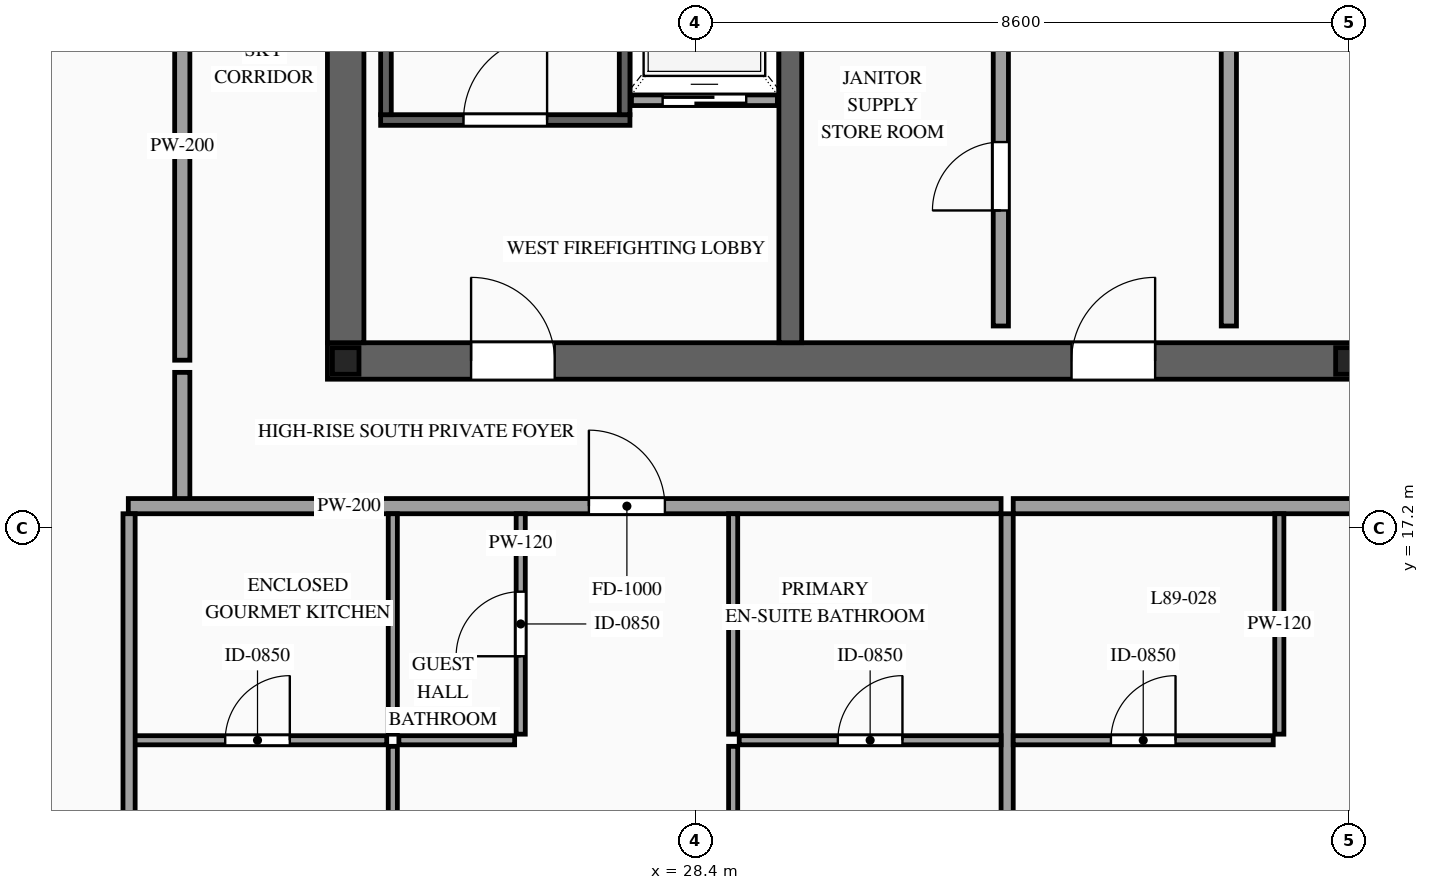
"""IFC4 building model, lengths in metres.
Left out: names, types, materials, properties, quantities, classifications, styles, units other than length and angle.
Written with IfcOpenShell. Run it as: python <this file> out.ifc"""

import sys

from ifc_helpers import new_model, si_unit, direction, frame, frame_2d, origin, origin_2d, place, context, subcontext, project, spatial, rectangle, i_section, extrude, source, transform, mapped, element, fill, save


model = new_model("IFC4")
c1 = context("Model", 3, precision=1e-05, world=origin(), true_north=direction((0.0, 1.0)))
c2 = subcontext(c1, "Body", "Model", "MODEL_VIEW")
j1 = project(units=[si_unit("LENGTHUNIT", "METRE"), si_unit("PLANEANGLEUNIT", "RADIAN")], contexts=[c1])
p1 = place(None, origin())
s1 = spatial("IfcSite", under=j1, at=p1, CompositionType="ELEMENT")
p2 = place(p1, origin())
s2 = spatial("IfcBuilding", under=s1, at=p2, CompositionType="ELEMENT")
p3 = place(p2, frame((0.0, 0.0, 332.2)))
s3 = spatial("IfcBuildingStorey", under=s2, at=p3, CompositionType="ELEMENT", Elevation=332.2)
p4 = place(p3, frame((23.56, 19.4, 0.0), z_axis=(0.0, 0.0, 1.0), x_axis=(1.0, 0.0, 0.0)))
e1 = element("IfcWall", 1, at=p4, inside=s3, PredefinedType="SHEAR", context=c2, shape_type="SweptSolid", body=[
    extrude(rectangle(XDim=26.88, YDim=0.48, at=frame_2d((13.44, 0.0))), origin(), (0.0, 0.0, 1.0), 3.5),
])
p5 = place(p4, frame((1.89, 0.0, 0.0)))
e2 = element("IfcOpeningElement", 2, at=p5, cuts=e1, PredefinedType="OPENING", context=c2, shape_type="SweptSolid", body=[
    extrude(rectangle(XDim=1.1, YDim=2.2, at=frame_2d((0.55, 1.1))), frame((0.0, 0.255, 0.0), z_axis=(0.0, -1.0, 0.0), x_axis=(1.0, 0.0, 0.0)), (0.0, 0.0, 1.0), 0.51),
])
p6 = place(p4, frame((9.79, 0.0, 0.0)))
e3 = element("IfcOpeningElement", 3, at=p6, cuts=e1, PredefinedType="OPENING", context=c2, shape_type="SweptSolid", body=[
    extrude(rectangle(XDim=1.1, YDim=2.2, at=frame_2d((0.55, 1.1))), frame((0.0, 0.255, 0.0), z_axis=(0.0, -1.0, 0.0), x_axis=(1.0, 0.0, 0.0)), (0.0, 0.0, 1.0), 0.51),
])
p7 = place(p4, frame((22.99, 0.0, 0.0)))
e4 = element("IfcOpeningElement", 4, at=p7, cuts=e1, PredefinedType="OPENING", context=c2, shape_type="SweptSolid", body=[
    extrude(rectangle(XDim=1.1, YDim=2.2, at=frame_2d((0.55, 1.1))), frame((0.0, 0.255, 0.0), z_axis=(0.0, -1.0, 0.0), x_axis=(1.0, 0.0, 0.0)), (0.0, 0.0, 1.0), 0.51),
])
p8 = place(p4, frame((19.61, 0.0, 0.0)))
e5 = element("IfcOpeningElement", 5, at=p8, cuts=e1, PredefinedType="OPENING", context=c2, shape_type="SweptSolid", body=[
    extrude(rectangle(XDim=0.9, YDim=2.15, at=frame_2d((0.45, 1.075))), frame((0.0, 0.255, 0.0), z_axis=(0.0, -1.0, 0.0), x_axis=(1.0, 0.0, 0.0)), (0.0, 0.0, 1.0), 0.51),
])
p9 = place(p4, frame((18.17, 0.0, 0.0)))
e6 = element("IfcOpeningElement", 6, at=p9, cuts=e1, PredefinedType="OPENING", context=c2, shape_type="SweptSolid", body=[
    extrude(rectangle(XDim=0.9, YDim=2.15, at=frame_2d((0.45, 1.075))), frame((0.0, 0.255, 0.0), z_axis=(0.0, -1.0, 0.0), x_axis=(1.0, 0.0, 0.0)), (0.0, 0.0, 1.0), 0.51),
])
m1 = source(origin(), c2, "Body", "SweptSolid", [
    extrude(rectangle(XDim=12.32, YDim=0.48, at=frame_2d((6.16, 0.0))), origin(), (0.0, 0.0, 1.0), 3.5),
])
p10 = place(p3, frame((23.8, 19.64, 0.0), z_axis=(0.0, 0.0, 1.0), x_axis=(0.0, 1.0, 0.0)))
e7 = element("IfcWall", 7, at=p10, inside=s3, PredefinedType="SHEAR", context=c2, shape_type="MappedRepresentation", body=[
    mapped(m1, transform((0.0, 0.0, 0.0), scale=1.0)),
])
m2 = source(origin(), c2, "Body", "SweptSolid", [
    extrude(rectangle(XDim=12.32, YDim=0.3, at=frame_2d((6.16, 0.0))), origin(), (0.0, 0.0, 1.0), 3.5),
])
p11 = place(p3, frame((29.65, 19.64, 0.0), z_axis=(0.0, 0.0, 1.0), x_axis=(0.0, 1.0, 0.0)))
e8 = element("IfcWall", 8, at=p11, inside=s3, PredefinedType="SOLIDWALL", context=c2, shape_type="MappedRepresentation", body=[
    mapped(m2, transform((0.0, 0.0, 0.0), scale=1.0)),
])
m3 = source(origin(), c2, "Body", "SweptSolid", [
    extrude(i_section(OverallWidth=0.35, OverallDepth=0.35, WebThickness=0.012, FlangeThickness=0.019, at=origin_2d()), origin(), (0.0, 0.0, 1.0), 3.5),
])
for number, where, z_axis, x_axis in (
    (9, (23.8, 19.4, 0.0), (0.0, 0.0, 1.0), (1.0, 0.0, 0.0)),
    (10, (37.0, 19.4, 0.0), (0.0, 0.0, 1.0), (1.0, 0.0, 0.0)),
):
    element("IfcColumn", number, at=place(p3, frame(where, z_axis=z_axis, x_axis=x_axis)), inside=s3, PredefinedType="COLUMN", context=c2, shape_type="MappedRepresentation", body=[
        mapped(m3, transform((0.0, 0.0, 0.0), scale=1.0)),
    ])
p12 = place(p3, frame((27.56, 22.83, 0.0), z_axis=(0.0, 0.0, 1.0), x_axis=(1.0, 0.0, 0.0)))
e11 = element("IfcWall", 11, at=p12, inside=s3, PredefinedType="SOLIDWALL", context=c2, shape_type="SweptSolid", body=[
    extrude(rectangle(XDim=1.92, YDim=0.14, at=frame_2d((0.96, 0.0))), origin(), (0.0, 0.0, 1.0), 3.28),
])
p13 = place(p12, frame((0.41, 0.0, 0.0)))
e12 = element("IfcOpeningElement", 12, at=p13, cuts=e11, PredefinedType="OPENING", context=c2, shape_type="SweptSolid", body=[
    extrude(rectangle(XDim=1.1, YDim=2.2, at=frame_2d((0.55, 1.1))), frame((0.0, 0.085, 0.0), z_axis=(0.0, -1.0, 0.0), x_axis=(1.0, 0.0, 0.0)), (0.0, 0.0, 1.0), 0.17),
])
p14 = place(p3, frame((24.26, 22.57, 0.0), z_axis=(0.0, 0.0, 1.0), x_axis=(1.0, 0.0, 0.0)))
e13 = element("IfcWall", 13, at=p14, inside=s3, PredefinedType="SOLIDWALL", context=c2, shape_type="SweptSolid", body=[
    extrude(rectangle(XDim=3.28, YDim=0.14, at=frame_2d((1.64, 0.0))), origin(), (0.0, 0.0, 1.0), 3.28),
])
p15 = place(p14, frame((1.09, 0.0, 0.0)))
e14 = element("IfcOpeningElement", 14, at=p15, cuts=e13, PredefinedType="OPENING", context=c2, shape_type="SweptSolid", body=[
    extrude(rectangle(XDim=1.1, YDim=2.2, at=frame_2d((0.55, 1.1))), frame((0.0, 0.085, 0.0), z_axis=(0.0, -1.0, 0.0), x_axis=(1.0, 0.0, 0.0)), (0.0, 0.0, 1.0), 0.17),
])
m4 = source(origin(), c2, "Body", "SweptSolid", [
    extrude(rectangle(XDim=8.94, YDim=0.14, at=frame_2d((4.47, 0.0))), origin(), (0.0, 0.0, 1.0), 3.28),
])
for number, where, z_axis, x_axis in (
    (15, (24.33, 22.64, 0.0), (0.0, 0.0, 1.0), (0.0, 1.0, 0.0)),
    (16, (27.47, 22.64, 0.0), (0.0, 0.0, 1.0), (0.0, 1.0, 0.0)),
):
    element("IfcWall", number, at=place(p3, frame(where, z_axis=z_axis, x_axis=x_axis)), inside=s3, PredefinedType="SOLIDWALL", context=c2, shape_type="MappedRepresentation", body=[
        mapped(m4, transform((0.0, 0.0, 0.0), scale=1.0)),
    ])
p16 = place(p3, frame((32.42, 19.86, 0.0), z_axis=(0.0, 0.0, 1.0), x_axis=(0.0, 1.0, 0.0)))
e17 = element("IfcWall", 17, at=p16, inside=s3, PredefinedType="PARTITIONING", context=c2, shape_type="SweptSolid", body=[
    extrude(rectangle(XDim=3.94, YDim=0.2, at=frame_2d((1.97, 0.0))), origin(), (0.0, 0.0, 1.0), 3.28),
])
p17 = place(p16, frame((1.52, 0.0, 0.0)))
e18 = element("IfcOpeningElement", 18, at=p17, cuts=e17, PredefinedType="OPENING", context=c2, shape_type="SweptSolid", body=[
    extrude(rectangle(XDim=0.9, YDim=2.15, at=frame_2d((0.45, 1.075))), frame((0.0, 0.115, 0.0), z_axis=(0.0, -1.0, 0.0), x_axis=(1.0, 0.0, 0.0)), (0.0, 0.0, 1.0), 0.23),
])
p18 = place(p3, frame((35.42, 19.86, 0.0), z_axis=(0.0, 0.0, 1.0), x_axis=(0.0, 1.0, 0.0)))
e19 = element("IfcWall", 19, at=p18, inside=s3, PredefinedType="PARTITIONING", context=c2, shape_type="SweptSolid", body=[
    extrude(rectangle(XDim=9.19, YDim=0.2, at=frame_2d((4.595, 0.0))), origin(), (0.0, 0.0, 1.0), 3.28),
])
p19 = place(p18, frame((4.145, 0.0, 0.0)))
e20 = element("IfcOpeningElement", 20, at=p19, cuts=e19, PredefinedType="OPENING", context=c2, shape_type="SweptSolid", body=[
    extrude(rectangle(XDim=0.9, YDim=2.15, at=frame_2d((0.45, 1.075))), frame((0.0, 0.115, 0.0), z_axis=(0.0, -1.0, 0.0), x_axis=(1.0, 0.0, 0.0)), (0.0, 0.0, 1.0), 0.23),
])
m5 = source(origin(), c2, "Body", "SweptSolid", [
    extrude(rectangle(XDim=1.7, YDim=0.2, at=frame_2d((0.85, 0.0))), origin(), (0.0, 0.0, 1.0), 3.28),
])
p20 = place(p3, frame((21.65, 17.55, 0.0), z_axis=(0.0, 0.0, 1.0), x_axis=(0.0, 1.0, 0.0)))
e21 = element("IfcWall", 21, at=p20, inside=s3, PredefinedType="PARTITIONING", context=c2, shape_type="MappedRepresentation", body=[
    mapped(m5, transform((0.0, 0.0, 0.0), scale=1.0)),
])
p21 = place(p3, frame((20.94, 17.49, 0.0), z_axis=(0.0, 0.0, 1.0), x_axis=(1.0, 0.0, 0.0)))
e22 = element("IfcWall", 22, at=p21, inside=s3, PredefinedType="PARTITIONING", context=c2, shape_type="SweptSolid", body=[
    extrude(rectangle(XDim=11.483, YDim=0.2, at=frame_2d((5.742, 0.0))), origin(), (0.0, 0.0, 1.0), 3.28),
])
p22 = place(p21, frame((6.06, 0.0, 0.0)))
e23 = element("IfcOpeningElement", 23, at=p22, cuts=e22, PredefinedType="OPENING", context=c2, shape_type="SweptSolid", body=[
    extrude(rectangle(XDim=1.0, YDim=2.2, at=frame_2d((0.5, 1.1))), frame((0.0, 0.115, 0.0), z_axis=(0.0, -1.0, 0.0), x_axis=(1.0, 0.0, 0.0)), (0.0, 0.0, 1.0), 0.23),
])
m6 = source(origin(), c2, "Body", "SweptSolid", [
    extrude(rectangle(XDim=10.54, YDim=0.16, at=frame_2d((5.27, 0.0))), origin(), (0.0, 0.0, 1.0), 3.28),
])
p23 = place(p3, frame((32.503, 6.85, 0.0), z_axis=(0.0, 0.0, 1.0), x_axis=(0.0, 1.0, 0.0)))
e24 = element("IfcWall", 24, at=p23, inside=s3, PredefinedType="PARTITIONING", context=c2, shape_type="MappedRepresentation", body=[
    mapped(m6, transform((0.0, 0.0, 0.0), scale=1.0)),
])
p24 = place(p3, frame((20.94, 14.41, 0.0), z_axis=(0.0, 0.0, 1.0), x_axis=(1.0, 0.0, 0.0)))
e25 = element("IfcWall", 25, at=p24, inside=s3, PredefinedType="PARTITIONING", context=c2, shape_type="SweptSolid", body=[
    extrude(rectangle(XDim=3.4, YDim=0.12, at=frame_2d((1.7, 0.0))), origin(), (0.0, 0.0, 1.0), 3.28),
])
p25 = place(p24, frame((1.275, 0.0, 0.0)))
e26 = element("IfcOpeningElement", 26, at=p25, cuts=e25, PredefinedType="OPENING", context=c2, shape_type="SweptSolid", body=[
    extrude(rectangle(XDim=0.85, YDim=2.1, at=frame_2d((0.425, 1.05))), frame((0.0, 0.075, 0.0), z_axis=(0.0, -1.0, 0.0), x_axis=(1.0, 0.0, 0.0)), (0.0, 0.0, 1.0), 0.15),
])
m7 = source(origin(), c2, "Body", "SweptSolid", [
    extrude(rectangle(XDim=2.9, YDim=0.12, at=frame_2d((1.45, 0.0))), origin(), (0.0, 0.0, 1.0), 3.28),
])
p26 = place(p3, frame((24.42, 14.49, 0.0), z_axis=(0.0, 0.0, 1.0), x_axis=(0.0, 1.0, 0.0)))
e27 = element("IfcWall", 27, at=p26, inside=s3, PredefinedType="PARTITIONING", context=c2, shape_type="MappedRepresentation", body=[
    mapped(m7, transform((0.0, 0.0, 0.0), scale=1.0)),
])
m8 = source(origin(), c2, "Body", "SweptSolid", [
    extrude(rectangle(XDim=1.523, YDim=0.12, at=frame_2d((0.761, 0.0))), origin(), (0.0, 0.0, 1.0), 3.28),
])
p27 = place(p3, frame((24.5, 14.41, 0.0), z_axis=(0.0, 0.0, 1.0), x_axis=(1.0, 0.0, 0.0)))
e28 = element("IfcWall", 28, at=p27, inside=s3, PredefinedType="PARTITIONING", context=c2, shape_type="MappedRepresentation", body=[
    mapped(m8, transform((0.0, 0.0, 0.0), scale=1.0)),
])
p28 = place(p3, frame((26.103, 14.49, 0.0), z_axis=(0.0, 0.0, 1.0), x_axis=(0.0, 1.0, 0.0)))
e29 = element("IfcWall", 29, at=p28, inside=s3, PredefinedType="PARTITIONING", context=c2, shape_type="SweptSolid", body=[
    extrude(rectangle(XDim=2.9, YDim=0.12, at=frame_2d((1.45, 0.0))), origin(), (0.0, 0.0, 1.0), 3.28),
])
p29 = place(p28, frame((1.025, 0.0, 0.0)))
e30 = element("IfcOpeningElement", 30, at=p29, cuts=e29, PredefinedType="OPENING", context=c2, shape_type="SweptSolid", body=[
    extrude(rectangle(XDim=0.85, YDim=2.1, at=frame_2d((0.425, 1.05))), frame((0.0, 0.075, 0.0), z_axis=(0.0, -1.0, 0.0), x_axis=(1.0, 0.0, 0.0)), (0.0, 0.0, 1.0), 0.15),
])
p30 = place(p3, frame((28.978, 14.41, 0.0), z_axis=(0.0, 0.0, 1.0), x_axis=(1.0, 0.0, 0.0)))
e31 = element("IfcWall", 31, at=p30, inside=s3, PredefinedType="PARTITIONING", context=c2, shape_type="SweptSolid", body=[
    extrude(rectangle(XDim=3.445, YDim=0.12, at=frame_2d((1.723, 0.0))), origin(), (0.0, 0.0, 1.0), 3.28),
])
p31 = place(p30, frame((1.298, 0.0, 0.0)))
e32 = element("IfcOpeningElement", 32, at=p31, cuts=e31, PredefinedType="OPENING", context=c2, shape_type="SweptSolid", body=[
    extrude(rectangle(XDim=0.85, YDim=2.1, at=frame_2d((0.425, 1.05))), frame((0.0, 0.075, 0.0), z_axis=(0.0, -1.0, 0.0), x_axis=(1.0, 0.0, 0.0)), (0.0, 0.0, 1.0), 0.15),
])
p32 = place(p3, frame((28.898, 14.49, 0.0), z_axis=(0.0, 0.0, 1.0), x_axis=(0.0, 1.0, 0.0)))
e33 = element("IfcWall", 33, at=p32, inside=s3, PredefinedType="PARTITIONING", context=c2, shape_type="MappedRepresentation", body=[
    mapped(m7, transform((0.0, 0.0, 0.0), scale=1.0)),
])
p33 = place(p3, frame((24.42, 6.85, 0.0), z_axis=(0.0, 0.0, 1.0), x_axis=(0.0, 1.0, 0.0)))
e34 = element("IfcWall", 34, at=p33, inside=s3, PredefinedType="PARTITIONING", context=c2, shape_type="SweptSolid", body=[
    extrude(rectangle(XDim=7.48, YDim=0.12, at=frame_2d((3.74, 0.0))), origin(), (0.0, 0.0, 1.0), 3.28),
])
p34 = place(p33, frame((3.29, 0.0, 0.0)))
e35 = element("IfcOpeningElement", 35, at=p34, cuts=e34, PredefinedType="OPENING", context=c2, shape_type="SweptSolid", body=[
    extrude(rectangle(XDim=0.9, YDim=2.15, at=frame_2d((0.45, 1.075))), frame((0.0, 0.075, 0.0), z_axis=(0.0, -1.0, 0.0), x_axis=(1.0, 0.0, 0.0)), (0.0, 0.0, 1.0), 0.15),
])
p35 = place(p3, frame((28.898, 6.85, 0.0), z_axis=(0.0, 0.0, 1.0), x_axis=(0.0, 1.0, 0.0)))
e36 = element("IfcWall", 36, at=p35, inside=s3, PredefinedType="PARTITIONING", context=c2, shape_type="SweptSolid", body=[
    extrude(rectangle(XDim=7.48, YDim=0.12, at=frame_2d((3.74, 0.0))), origin(), (0.0, 0.0, 1.0), 3.28),
])
p36 = place(p35, frame((3.29, 0.0, 0.0)))
e37 = element("IfcOpeningElement", 37, at=p36, cuts=e36, PredefinedType="OPENING", context=c2, shape_type="SweptSolid", body=[
    extrude(rectangle(XDim=0.9, YDim=2.15, at=frame_2d((0.45, 1.075))), frame((0.0, 0.075, 0.0), z_axis=(0.0, -1.0, 0.0), x_axis=(1.0, 0.0, 0.0)), (0.0, 0.0, 1.0), 0.15),
])
p37 = place(p3, frame((32.583, 17.49, 0.0), z_axis=(0.0, 0.0, 1.0), x_axis=(1.0, 0.0, 0.0)))
e38 = element("IfcWall", 38, at=p37, inside=s3, PredefinedType="PARTITIONING", context=c2, shape_type="SweptSolid", body=[
    extrude(rectangle(XDim=11.403, YDim=0.2, at=frame_2d((5.702, 0.0))), origin(), (0.0, 0.0, 1.0), 3.28),
])
p38 = place(p37, frame((4.517, 0.0, 0.0)))
e39 = element("IfcOpeningElement", 39, at=p38, cuts=e38, PredefinedType="OPENING", context=c2, shape_type="SweptSolid", body=[
    extrude(rectangle(XDim=1.0, YDim=2.2, at=frame_2d((0.5, 1.1))), frame((0.0, 0.115, 0.0), z_axis=(0.0, -1.0, 0.0), x_axis=(1.0, 0.0, 0.0)), (0.0, 0.0, 1.0), 0.23),
])
p39 = place(p3, frame((32.583, 14.41, 0.0), z_axis=(0.0, 0.0, 1.0), x_axis=(1.0, 0.0, 0.0)))
e40 = element("IfcWall", 40, at=p39, inside=s3, PredefinedType="PARTITIONING", context=c2, shape_type="SweptSolid", body=[
    extrude(rectangle(XDim=3.421, YDim=0.12, at=frame_2d((1.71, 0.0))), origin(), (0.0, 0.0, 1.0), 3.28),
])
p40 = place(p39, frame((1.285, 0.0, 0.0)))
e41 = element("IfcOpeningElement", 41, at=p40, cuts=e40, PredefinedType="OPENING", context=c2, shape_type="SweptSolid", body=[
    extrude(rectangle(XDim=0.85, YDim=2.1, at=frame_2d((0.425, 1.05))), frame((0.0, 0.075, 0.0), z_axis=(0.0, -1.0, 0.0), x_axis=(1.0, 0.0, 0.0)), (0.0, 0.0, 1.0), 0.15),
])
p41 = place(p3, frame((36.084, 14.49, 0.0), z_axis=(0.0, 0.0, 1.0), x_axis=(0.0, 1.0, 0.0)))
e42 = element("IfcWall", 42, at=p41, inside=s3, PredefinedType="PARTITIONING", context=c2, shape_type="MappedRepresentation", body=[
    mapped(m7, transform((0.0, 0.0, 0.0), scale=1.0)),
])
m9 = source(origin(), c2, "Body", "SweptSolid", [
    extrude(rectangle(XDim=10.39, YDim=0.16, at=frame_2d((5.195, 0.0))), origin(), (0.0, 0.0, 1.0), 3.28),
])
p42 = place(p3, frame((20.95, 7.0, 0.0), z_axis=(0.0, 0.0, 1.0), x_axis=(0.0, 1.0, 0.0)))
e43 = element("IfcWall", 43, at=p42, inside=s3, PredefinedType="PARTITIONING", context=c2, shape_type="MappedRepresentation", body=[
    mapped(m9, transform((0.0, 0.0, 0.0), scale=1.0)),
])
p43 = place(p3, frame((21.65, 19.41, 0.0), z_axis=(0.0, 0.0, 1.0), x_axis=(0.0, 1.0, 0.0)))
e44 = element("IfcWall", 44, at=p43, inside=s3, PredefinedType="PARTITIONING", context=c2, shape_type="SweptSolid", body=[
    extrude(rectangle(XDim=12.78, YDim=0.2, at=frame_2d((6.39, 0.0))), origin(), (0.0, 0.0, 1.0), 3.28),
])
p44 = place(p43, frame((5.89, 0.0, 0.0)))
e45 = element("IfcOpeningElement", 45, at=p44, cuts=e44, PredefinedType="OPENING", context=c2, shape_type="SweptSolid", body=[
    extrude(rectangle(XDim=1.0, YDim=2.2, at=frame_2d((0.5, 1.1))), frame((0.0, 0.115, 0.0), z_axis=(0.0, -1.0, 0.0), x_axis=(1.0, 0.0, 0.0)), (0.0, 0.0, 1.0), 0.23),
])
m10 = source(origin(), c2, "Body", "SweptSolid", [
    extrude(rectangle(XDim=1.1, YDim=2.2, at=frame_2d((0.55, 1.1))), frame((0.0, 0.025, 0.0), z_axis=(0.0, -1.0, 0.0), x_axis=(1.0, 0.0, 0.0)), (0.0, 0.0, 1.0), 0.05),
])
p45 = place(p13, origin())
e46 = element("IfcDoor", 46, at=p45, inside=s3, OperationType="SLIDING_TO_LEFT", PredefinedType="DOOR", context=c2, shape_type="MappedRepresentation", body=[
    mapped(m10, transform((0.0, 0.0, 0.0), scale=1.0)),
])
fill(e12, e46)
m11 = source(origin(), c2, "Body", "SweptSolid", [
    extrude(rectangle(XDim=1.1, YDim=2.2, at=frame_2d((0.55, 1.1))), frame((0.0, 0.025, 0.0), z_axis=(0.0, -1.0, 0.0), x_axis=(1.0, 0.0, 0.0)), (0.0, 0.0, 1.0), 0.05),
])
p46 = place(p15, origin())
e47 = element("IfcDoor", 47, at=p46, inside=s3, OperationType="SINGLE_SWING_RIGHT", PredefinedType="DOOR", context=c2, shape_type="MappedRepresentation", body=[
    mapped(m11, transform((0.0, 0.0, 0.0), scale=1.0)),
])
fill(e14, e47)
p47 = place(p5, origin())
e48 = element("IfcDoor", 48, at=p47, inside=s3, OperationType="SINGLE_SWING_LEFT", PredefinedType="DOOR", context=c2, shape_type="MappedRepresentation", body=[
    mapped(m11, transform((0.0, 0.0, 0.0), scale=1.0)),
])
fill(e2, e48)
p48 = place(p6, origin())
e49 = element("IfcDoor", 49, at=p48, inside=s3, OperationType="SINGLE_SWING_RIGHT", PredefinedType="DOOR", context=c2, shape_type="MappedRepresentation", body=[
    mapped(m11, transform((0.0, 0.0, 0.0), scale=1.0)),
])
fill(e3, e49)
m12 = source(origin(), c2, "Body", "SweptSolid", [
    extrude(rectangle(XDim=0.9, YDim=2.15, at=frame_2d((0.45, 1.075))), frame((0.0, 0.025, 0.0), z_axis=(0.0, -1.0, 0.0), x_axis=(1.0, 0.0, 0.0)), (0.0, 0.0, 1.0), 0.05),
])
p49 = place(p17, origin())
e50 = element("IfcDoor", 50, at=p49, inside=s3, OperationType="SINGLE_SWING_LEFT", PredefinedType="DOOR", context=c2, shape_type="MappedRepresentation", body=[
    mapped(m12, transform((0.0, 0.0, 0.0), scale=1.0)),
])
fill(e18, e50)
m13 = source(origin(), c2, "Body", "SweptSolid", [
    extrude(rectangle(XDim=1.0, YDim=2.2, at=frame_2d((0.5, 1.1))), frame((0.0, 0.025, 0.0), z_axis=(0.0, -1.0, 0.0), x_axis=(1.0, 0.0, 0.0)), (0.0, 0.0, 1.0), 0.05),
])
p50 = place(p22, origin())
e51 = element("IfcDoor", 51, at=p50, inside=s3, OperationType="SINGLE_SWING_LEFT", PredefinedType="DOOR", context=c2, shape_type="MappedRepresentation", body=[
    mapped(m13, transform((0.0, 0.0, 0.0), scale=1.0)),
])
fill(e23, e51)
m14 = source(origin(), c2, "Body", "SweptSolid", [
    extrude(rectangle(XDim=0.85, YDim=2.1, at=frame_2d((0.425, 1.05))), frame((0.0, 0.025, 0.0), z_axis=(0.0, -1.0, 0.0), x_axis=(1.0, 0.0, 0.0)), (0.0, 0.0, 1.0), 0.05),
])
p51 = place(p25, origin())
e52 = element("IfcDoor", 52, at=p51, inside=s3, OperationType="SINGLE_SWING_RIGHT", PredefinedType="DOOR", context=c2, shape_type="MappedRepresentation", body=[
    mapped(m14, transform((0.0, 0.0, 0.0), scale=1.0)),
])
fill(e26, e52)
p52 = place(p29, origin())
e53 = element("IfcDoor", 53, at=p52, inside=s3, OperationType="SINGLE_SWING_LEFT", PredefinedType="DOOR", context=c2, shape_type="MappedRepresentation", body=[
    mapped(m14, transform((0.0, 0.0, 0.0), scale=1.0)),
])
fill(e30, e53)
p53 = place(p31, origin())
e54 = element("IfcDoor", 54, at=p53, inside=s3, OperationType="SINGLE_SWING_RIGHT", PredefinedType="DOOR", context=c2, shape_type="MappedRepresentation", body=[
    mapped(m14, transform((0.0, 0.0, 0.0), scale=1.0)),
])
fill(e32, e54)
p54 = place(p40, origin())
e55 = element("IfcDoor", 55, at=p54, inside=s3, OperationType="SINGLE_SWING_RIGHT", PredefinedType="DOOR", context=c2, shape_type="MappedRepresentation", body=[
    mapped(m14, transform((0.0, 0.0, 0.0), scale=1.0)),
])
fill(e41, e55)
save(model, sys.argv[1])
